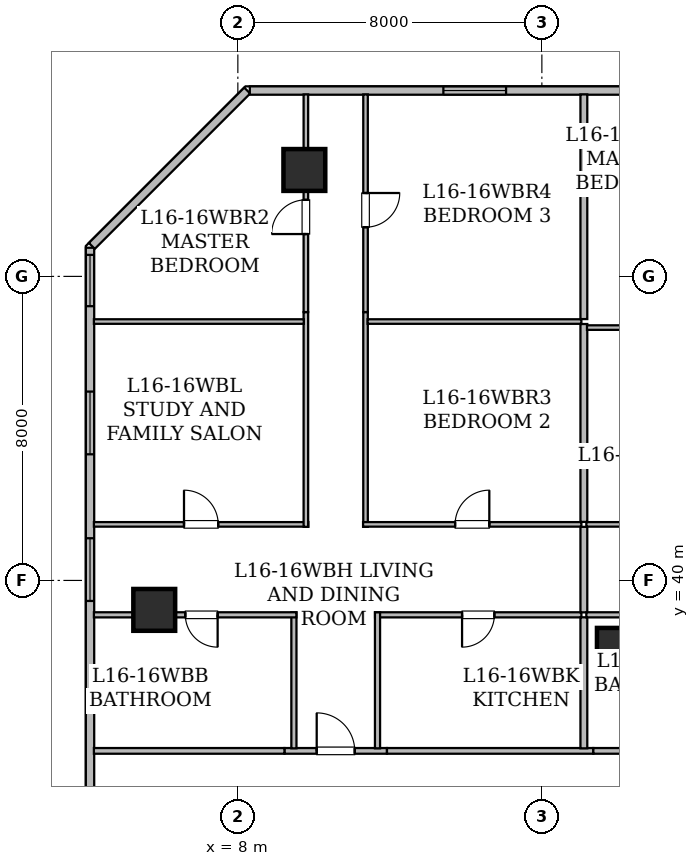
"""IFC4 building model, lengths in metres.
Left out: names, types, materials, properties, quantities, classifications, styles, units other than length and angle.
Written with IfcOpenShell. Run it as: python <this file> out.ifc"""

import sys

from ifc_helpers import new_model, si_unit, direction, frame, frame_2d, origin, origin_2d, place, context, subcontext, project, spatial, rectangle, hollow_rectangle, extrude, element, fill, save


model = new_model("IFC4")
c1 = context("Model", 3, precision=1e-05, world=origin(), true_north=direction((0.0, 1.0)))
c2 = subcontext(c1, "Body", "Model", "MODEL_VIEW")
j1 = project(units=[si_unit("LENGTHUNIT", "METRE"), si_unit("PLANEANGLEUNIT", "RADIAN")], contexts=[c1])
p1 = place(None, origin())
s1 = spatial("IfcSite", under=j1, at=p1, CompositionType="ELEMENT")
p2 = place(p1, origin())
s2 = spatial("IfcBuilding", under=s1, at=p2, CompositionType="ELEMENT")
p3 = place(p2, frame((0.0, 0.0, 66.15)))
s3 = spatial("IfcBuildingStorey", under=s2, at=p3, CompositionType="ELEMENT", Elevation=66.15)
for number, where, z_axis, x_axis in (
    (1, (9.75, 50.8, 0.0), (0.0, 0.0, 1.0), (1.0, 0.0, 0.0)),
    (2, (5.8, 39.225, 0.0), (0.0, 0.0, 1.0), (1.0, 0.0, 0.0)),
    (3, (18.0, 38.2, 0.0), (0.0, 0.0, 1.0), (1.0, 0.0, 0.0)),
):
    element("IfcColumn", number, at=place(p3, frame(where, z_axis=z_axis, x_axis=x_axis)), inside=s3, PredefinedType="COLUMN", context=c2, shape_type="SweptSolid", body=[
        extrude(hollow_rectangle(XDim=1.1, YDim=1.1, WallThickness=0.055, at=origin_2d()), origin(), (0.0, 0.0, 1.0), 3.65),
    ])
p4 = place(p3, frame((4.11, 31.295, 0.0), z_axis=(0.0, 0.0, 1.0), x_axis=(0.0, 1.0, 0.0)))
e4 = element("IfcWall", 4, at=p4, inside=s3, PredefinedType="STANDARD", context=c2, shape_type="SweptSolid", body=[
    extrude(rectangle(XDim=17.459, YDim=0.22, at=frame_2d((8.729, 0.0))), origin(), (0.0, 0.0, 1.0), 3.43),
])
p5 = place(p4, frame((8.165, 0.0, 0.85)))
e5 = element("IfcOpeningElement", 5, at=p5, cuts=e4, PredefinedType="OPENING", context=c2, shape_type="SweptSolid", body=[
    extrude(rectangle(XDim=1.65, YDim=1.55, at=frame_2d((0.825, 0.775))), frame((0.0, 0.12, 0.0), z_axis=(0.0, -1.0, 0.0), x_axis=(1.0, 0.0, 0.0)), (0.0, 0.0, 1.0), 0.24),
])
p6 = place(p4, frame((12.024, 0.0, 0.85)))
e6 = element("IfcOpeningElement", 6, at=p6, cuts=e4, PredefinedType="OPENING", context=c2, shape_type="SweptSolid", body=[
    extrude(rectangle(XDim=1.65, YDim=1.55, at=frame_2d((0.825, 0.775))), frame((0.0, 0.12, 0.0), z_axis=(0.0, -1.0, 0.0), x_axis=(1.0, 0.0, 0.0)), (0.0, 0.0, 1.0), 0.24),
])
p7 = place(p4, frame((15.921, 0.0, 0.85)))
e7 = element("IfcOpeningElement", 7, at=p7, cuts=e4, PredefinedType="OPENING", context=c2, shape_type="SweptSolid", body=[
    extrude(rectangle(XDim=1.35, YDim=1.5, at=frame_2d((0.675, 0.75))), frame((0.0, 0.12, 0.0), z_axis=(0.0, -1.0, 0.0), x_axis=(1.0, 0.0, 0.0)), (0.0, 0.0, 1.0), 0.24),
])
p8 = place(p3, frame((4.158, 48.802, 0.0), z_axis=(0.0, 0.0, 1.0), x_axis=(0.70712789547, 0.707085666273, 0.0)))
e8 = element("IfcWall", 8, at=p8, inside=s3, PredefinedType="STANDARD", context=c2, shape_type="SweptSolid", body=[
    extrude(rectangle(XDim=5.781, YDim=0.22, at=frame_2d((2.891, 0.0))), origin(), (0.0, 0.0, 1.0), 3.43),
])
p9 = place(p3, frame((8.315, 52.89, 0.0), z_axis=(0.0, 0.0, 1.0), x_axis=(1.0, 0.0, 0.0)))
e9 = element("IfcWall", 9, at=p9, inside=s3, PredefinedType="STANDARD", context=c2, shape_type="SweptSolid", body=[
    extrude(rectangle(XDim=37.439, YDim=0.22, at=frame_2d((18.719, 0.0))), origin(), (0.0, 0.0, 1.0), 3.43),
])
p10 = place(p9, frame((5.093, 0.0, 0.85)))
e10 = element("IfcOpeningElement", 10, at=p10, cuts=e9, PredefinedType="OPENING", context=c2, shape_type="SweptSolid", body=[
    extrude(rectangle(XDim=1.65, YDim=1.55, at=frame_2d((0.825, 0.775))), frame((0.0, 0.12, 0.0), z_axis=(0.0, -1.0, 0.0), x_axis=(1.0, 0.0, 0.0)), (0.0, 0.0, 1.0), 0.24),
])
p11 = place(p9, frame((13.055, 0.0, 0.8)))
e11 = element("IfcOpeningElement", 11, at=p11, cuts=e9, PredefinedType="OPENING", context=c2, shape_type="SweptSolid", body=[
    extrude(rectangle(XDim=1.2, YDim=1.5, at=frame_2d((0.6, 0.75))), frame((0.0, 0.12, 0.0), z_axis=(0.0, -1.0, 0.0), x_axis=(1.0, 0.0, 0.0)), (0.0, 0.0, 1.0), 0.24),
])
p12 = place(p9, frame((10.005, 0.0, 0.85)))
e12 = element("IfcOpeningElement", 12, at=p12, cuts=e9, PredefinedType="OPENING", context=c2, shape_type="SweptSolid", body=[
    extrude(rectangle(XDim=1.65, YDim=1.55, at=frame_2d((0.825, 0.775))), frame((0.0, 0.12, 0.0), z_axis=(0.0, -1.0, 0.0), x_axis=(1.0, 0.0, 0.0)), (0.0, 0.0, 1.0), 0.24),
])
p13 = place(p9, frame((15.655, 0.0, 0.85)))
e13 = element("IfcOpeningElement", 13, at=p13, cuts=e9, PredefinedType="OPENING", context=c2, shape_type="SweptSolid", body=[
    extrude(rectangle(XDim=1.65, YDim=1.55, at=frame_2d((0.825, 0.775))), frame((0.0, 0.12, 0.0), z_axis=(0.0, -1.0, 0.0), x_axis=(1.0, 0.0, 0.0)), (0.0, 0.0, 1.0), 0.24),
])
p14 = place(p9, frame((25.185, 0.0, 0.8)))
e14 = element("IfcOpeningElement", 14, at=p14, cuts=e9, PredefinedType="OPENING", context=c2, shape_type="SweptSolid", body=[
    extrude(rectangle(XDim=1.2, YDim=1.5, at=frame_2d((0.6, 0.75))), frame((0.0, 0.12, 0.0), z_axis=(0.0, -1.0, 0.0), x_axis=(1.0, 0.0, 0.0)), (0.0, 0.0, 1.0), 0.24),
])
p15 = place(p9, frame((20.935, 0.0, 0.85)))
e15 = element("IfcOpeningElement", 15, at=p15, cuts=e9, PredefinedType="OPENING", context=c2, shape_type="SweptSolid", body=[
    extrude(rectangle(XDim=1.65, YDim=1.55, at=frame_2d((0.825, 0.775))), frame((0.0, 0.12, 0.0), z_axis=(0.0, -1.0, 0.0), x_axis=(1.0, 0.0, 0.0)), (0.0, 0.0, 1.0), 0.24),
])
p16 = place(p9, frame((28.985, 0.0, 0.85)))
e16 = element("IfcOpeningElement", 16, at=p16, cuts=e9, PredefinedType="OPENING", context=c2, shape_type="SweptSolid", body=[
    extrude(rectangle(XDim=1.65, YDim=1.55, at=frame_2d((0.825, 0.775))), frame((0.0, 0.12, 0.0), z_axis=(0.0, -1.0, 0.0), x_axis=(1.0, 0.0, 0.0)), (0.0, 0.0, 1.0), 0.24),
])
p17 = place(p9, frame((33.49, 0.0, 0.85)))
e17 = element("IfcOpeningElement", 17, at=p17, cuts=e9, PredefinedType="OPENING", context=c2, shape_type="SweptSolid", body=[
    extrude(rectangle(XDim=1.65, YDim=1.55, at=frame_2d((0.825, 0.775))), frame((0.0, 0.12, 0.0), z_axis=(0.0, -1.0, 0.0), x_axis=(1.0, 0.0, 0.0)), (0.0, 0.0, 1.0), 0.24),
])
p18 = place(p9, frame((35.942, 0.0, 0.85)))
e18 = element("IfcOpeningElement", 18, at=p18, cuts=e9, PredefinedType="OPENING", context=c2, shape_type="SweptSolid", body=[
    extrude(rectangle(XDim=1.35, YDim=1.5, at=frame_2d((0.675, 0.75))), frame((0.0, 0.12, 0.0), z_axis=(0.0, -1.0, 0.0), x_axis=(1.0, 0.0, 0.0)), (0.0, 0.0, 1.0), 0.24),
])
p19 = place(p3, frame((9.226, 35.515, 0.0), z_axis=(0.0, 0.0, 1.0), x_axis=(1.0, 0.0, 0.0)))
e19 = element("IfcWall", 19, at=p19, inside=s3, PredefinedType="STANDARD", context=c2, shape_type="SweptSolid", body=[
    extrude(rectangle(XDim=2.698, YDim=0.15, at=frame_2d((1.349, 0.0))), origin(), (0.0, 0.0, 1.0), 3.43),
])
p20 = place(p19, frame((0.849, 0.0, 0.0)))
e20 = element("IfcOpeningElement", 20, at=p20, cuts=e19, PredefinedType="OPENING", context=c2, shape_type="SweptSolid", body=[
    extrude(rectangle(XDim=1.0, YDim=2.15, at=frame_2d((0.5, 1.075))), frame((0.0, 0.085, 0.0), z_axis=(0.0, -1.0, 0.0), x_axis=(1.0, 0.0, 0.0)), (0.0, 0.0, 1.0), 0.17),
])
p21 = place(p3, frame((4.212, 35.515, 0.0), z_axis=(0.0, 0.0, 1.0), x_axis=(1.0, 0.0, 0.0)))
e21 = element("IfcWall", 21, at=p21, inside=s3, PredefinedType="STANDARD", context=c2, shape_type="SweptSolid", body=[
    extrude(rectangle(XDim=5.014, YDim=0.15, at=frame_2d((2.507, 0.0))), origin(), (0.0, 0.0, 1.0), 2.803),
])
p22 = place(p3, frame((11.924, 35.515, 0.0), z_axis=(0.0, 0.0, 1.0), x_axis=(1.0, 0.0, 0.0)))
e22 = element("IfcWall", 22, at=p22, inside=s3, PredefinedType="STANDARD", context=c2, shape_type="SweptSolid", body=[
    extrude(rectangle(XDim=5.43, YDim=0.15, at=frame_2d((2.715, 0.0))), origin(), (0.0, 0.0, 1.0), 3.43),
])
p23 = place(p3, frame((17.354, 35.515, 0.0), z_axis=(0.0, 0.0, 1.0), x_axis=(1.0, 0.0, 0.0)))
e23 = element("IfcWall", 23, at=p23, inside=s3, PredefinedType="STANDARD", context=c2, shape_type="SweptSolid", body=[
    extrude(rectangle(XDim=3.267, YDim=0.15, at=frame_2d((1.634, 0.0))), origin(), (0.0, 0.0, 1.0), 2.647),
])
p24 = place(p3, frame((9.475, 35.582, 0.0), z_axis=(0.0, 0.0, 1.0), x_axis=(0.0, 1.0, 0.0)))
e24 = element("IfcWall", 24, at=p24, inside=s3, PredefinedType="PARTITIONING", context=c2, shape_type="SweptSolid", body=[
    extrude(rectangle(XDim=3.578, YDim=0.135, at=frame_2d((1.789, 0.0))), origin(), (0.0, 0.0, 1.0), 2.647),
])
p25 = place(p3, frame((9.54, 39.095, 0.0), z_axis=(0.0, 0.0, 1.0), x_axis=(-1.0, 0.0, 0.0)))
e25 = element("IfcWall", 25, at=p25, inside=s3, PredefinedType="PARTITIONING", context=c2, shape_type="SweptSolid", body=[
    extrude(rectangle(XDim=5.328, YDim=0.135, at=frame_2d((2.664, 0.0))), origin(), (0.0, 0.0, 1.0), 2.647),
])
p26 = place(p25, frame((2.072, 0.0, 0.0)))
e26 = element("IfcOpeningElement", 26, at=p26, cuts=e25, PredefinedType="OPENING", context=c2, shape_type="SweptSolid", body=[
    extrude(rectangle(XDim=0.85, YDim=2.1, at=frame_2d((0.425, 1.05))), frame((0.0, 0.077, 0.0), z_axis=(0.0, -1.0, 0.0), x_axis=(1.0, 0.0, 0.0)), (0.0, 0.0, 1.0), 0.155),
])
p27 = place(p3, frame((17.04, 39.095, 0.0), z_axis=(0.0, 0.0, 1.0), x_axis=(-1.0, 0.0, 0.0)))
e27 = element("IfcWall", 27, at=p27, inside=s3, PredefinedType="PARTITIONING", context=c2, shape_type="SweptSolid", body=[
    extrude(rectangle(XDim=5.43, YDim=0.135, at=frame_2d((2.715, 0.0))), origin(), (0.0, 0.0, 1.0), 2.647),
])
p28 = place(p27, frame((2.29, 0.0, 0.0)))
e28 = element("IfcOpeningElement", 28, at=p28, cuts=e27, PredefinedType="OPENING", context=c2, shape_type="SweptSolid", body=[
    extrude(rectangle(XDim=0.85, YDim=2.1, at=frame_2d((0.425, 1.05))), frame((0.0, 0.077, 0.0), z_axis=(0.0, -1.0, 0.0), x_axis=(1.0, 0.0, 0.0)), (0.0, 0.0, 1.0), 0.155),
])
p29 = place(p3, frame((11.675, 39.16, 0.0), z_axis=(0.0, 0.0, 1.0), x_axis=(0.0, -1.0, 0.0)))
e29 = element("IfcWall", 29, at=p29, inside=s3, PredefinedType="PARTITIONING", context=c2, shape_type="SweptSolid", body=[
    extrude(rectangle(XDim=3.578, YDim=0.135, at=frame_2d((1.789, 0.0))), origin(), (0.0, 0.0, 1.0), 2.647),
])
p30 = place(p3, frame((4.212, 41.475, 0.0), z_axis=(0.0, 0.0, 1.0), x_axis=(1.0, 0.0, 0.0)))
e30 = element("IfcWall", 30, at=p30, inside=s3, PredefinedType="PARTITIONING", context=c2, shape_type="SweptSolid", body=[
    extrude(rectangle(XDim=5.643, YDim=0.12, at=frame_2d((2.822, 0.0))), origin(), (0.0, 0.0, 1.0), 2.803),
])
p31 = place(p30, frame((2.371, 0.0, 0.0)))
e31 = element("IfcOpeningElement", 31, at=p31, cuts=e30, PredefinedType="OPENING", context=c2, shape_type="SweptSolid", body=[
    extrude(rectangle(XDim=0.9, YDim=2.1, at=frame_2d((0.45, 1.05))), frame((0.0, 0.07, 0.0), z_axis=(0.0, -1.0, 0.0), x_axis=(1.0, 0.0, 0.0)), (0.0, 0.0, 1.0), 0.14),
])
p32 = place(p3, frame((9.79, 41.41, 0.0), z_axis=(0.0, 0.0, 1.0), x_axis=(0.0, 1.0, 0.0)))
e32 = element("IfcWall", 32, at=p32, inside=s3, PredefinedType="PARTITIONING", context=c2, shape_type="SweptSolid", body=[
    extrude(rectangle(XDim=5.651, YDim=0.12, at=frame_2d((2.826, 0.0))), origin(), (0.0, 0.0, 1.0), 3.065),
])
p33 = place(p3, frame((9.79, 47.061, 0.0), z_axis=(0.0, 0.0, 1.0), x_axis=(0.0, 1.0, 0.0)))
e33 = element("IfcWall", 33, at=p33, inside=s3, PredefinedType="PARTITIONING", context=c2, shape_type="SweptSolid", body=[
    extrude(rectangle(XDim=5.727, YDim=0.12, at=frame_2d((2.864, 0.0))), origin(), (0.0, 0.0, 1.0), 2.647),
])
p34 = place(p33, frame((2.053, 0.0, 0.0)))
e34 = element("IfcOpeningElement", 34, at=p34, cuts=e33, PredefinedType="OPENING", context=c2, shape_type="SweptSolid", body=[
    extrude(rectangle(XDim=0.9, YDim=2.1, at=frame_2d((0.45, 1.05))), frame((0.0, 0.07, 0.0), z_axis=(0.0, -1.0, 0.0), x_axis=(1.0, 0.0, 0.0)), (0.0, 0.0, 1.0), 0.14),
])
p35 = place(p3, frame((11.36, 47.061, 0.0), z_axis=(0.0, 0.0, 1.0), x_axis=(0.0, -1.0, 0.0)))
e35 = element("IfcWall", 35, at=p35, inside=s3, PredefinedType="PARTITIONING", context=c2, shape_type="SweptSolid", body=[
    extrude(rectangle(XDim=5.651, YDim=0.12, at=frame_2d((2.826, 0.0))), origin(), (0.0, 0.0, 1.0), 3.065),
])
p36 = place(p3, frame((11.295, 41.475, 0.0), z_axis=(0.0, 0.0, 1.0), x_axis=(1.0, 0.0, 0.0)))
e36 = element("IfcWall", 36, at=p36, inside=s3, PredefinedType="PARTITIONING", context=c2, shape_type="SweptSolid", body=[
    extrude(rectangle(XDim=5.745, YDim=0.12, at=frame_2d((2.873, 0.0))), origin(), (0.0, 0.0, 1.0), 2.647),
])
p37 = place(p36, frame((2.422, 0.0, 0.0)))
e37 = element("IfcOpeningElement", 37, at=p37, cuts=e36, PredefinedType="OPENING", context=c2, shape_type="SweptSolid", body=[
    extrude(rectangle(XDim=0.9, YDim=2.1, at=frame_2d((0.45, 1.05))), frame((0.0, 0.07, 0.0), z_axis=(0.0, -1.0, 0.0), x_axis=(1.0, 0.0, 0.0)), (0.0, 0.0, 1.0), 0.14),
])
p38 = place(p3, frame((11.36, 52.788, 0.0), z_axis=(0.0, 0.0, 1.0), x_axis=(0.0, -1.0, 0.0)))
e38 = element("IfcWall", 38, at=p38, inside=s3, PredefinedType="PARTITIONING", context=c2, shape_type="SweptSolid", body=[
    extrude(rectangle(XDim=5.727, YDim=0.12, at=frame_2d((2.864, 0.0))), origin(), (0.0, 0.0, 1.0), 2.647),
])
p39 = place(p38, frame((2.594, 0.0, 0.0)))
e39 = element("IfcOpeningElement", 39, at=p39, cuts=e38, PredefinedType="OPENING", context=c2, shape_type="SweptSolid", body=[
    extrude(rectangle(XDim=0.9, YDim=2.1, at=frame_2d((0.45, 1.05))), frame((0.0, 0.07, 0.0), z_axis=(0.0, -1.0, 0.0), x_axis=(1.0, 0.0, 0.0)), (0.0, 0.0, 1.0), 0.14),
])
p40 = place(p3, frame((17.105, 41.41, 0.0), z_axis=(0.0, 0.0, 1.0), x_axis=(0.0, -1.0, 0.0)))
e40 = element("IfcWall", 40, at=p40, inside=s3, PredefinedType="STANDARD", context=c2, shape_type="SweptSolid", body=[
    extrude(rectangle(XDim=2.25, YDim=0.18, at=frame_2d((1.125, 0.0))), origin(), (0.0, 0.0, 1.0), 2.647),
])
p41 = place(p3, frame((17.105, 39.03, 0.0), z_axis=(0.0, 0.0, 1.0), x_axis=(0.0, -1.0, 0.0)))
e41 = element("IfcWall", 41, at=p41, inside=s3, PredefinedType="STANDARD", context=c2, shape_type="SweptSolid", body=[
    extrude(rectangle(XDim=3.448, YDim=0.18, at=frame_2d((1.724, 0.0))), origin(), (0.0, 0.0, 1.0), 2.647),
])
p42 = place(p3, frame((4.212, 46.812, 0.0), z_axis=(0.0, 0.0, 1.0), x_axis=(1.0, 0.0, 0.0)))
e42 = element("IfcWall", 42, at=p42, inside=s3, PredefinedType="PARTITIONING", context=c2, shape_type="SweptSolid", body=[
    extrude(rectangle(XDim=5.524, YDim=0.12, at=frame_2d((2.762, 0.0))), origin(), (0.0, 0.0, 1.0), 2.803),
])
p43 = place(p3, frame((11.414, 46.812, 0.0), z_axis=(0.0, 0.0, 1.0), x_axis=(1.0, 0.0, 0.0)))
e43 = element("IfcWall", 43, at=p43, inside=s3, PredefinedType="PARTITIONING", context=c2, shape_type="SweptSolid", body=[
    extrude(rectangle(XDim=5.626, YDim=0.12, at=frame_2d((2.813, 0.0))), origin(), (0.0, 0.0, 1.0), 2.647),
])
p44 = place(p3, frame((17.105, 46.747, 0.0), z_axis=(0.0, 0.0, 1.0), x_axis=(0.0, -1.0, 0.0)))
e44 = element("IfcWall", 44, at=p44, inside=s3, PredefinedType="STANDARD", context=c2, shape_type="SweptSolid", body=[
    extrude(rectangle(XDim=5.207, YDim=0.18, at=frame_2d((2.604, 0.0))), origin(), (0.0, 0.0, 1.0), 3.065),
])
p45 = place(p3, frame((17.105, 52.788, 0.0), z_axis=(0.0, 0.0, 1.0), x_axis=(0.0, -1.0, 0.0)))
e45 = element("IfcWall", 45, at=p45, inside=s3, PredefinedType="STANDARD", context=c2, shape_type="SweptSolid", body=[
    extrude(rectangle(XDim=5.911, YDim=0.18, at=frame_2d((2.956, 0.0))), origin(), (0.0, 0.0, 1.0), 2.803),
])
p46 = place(p3, frame((20.935, 39.095, 0.0), z_axis=(0.0, 0.0, 1.0), x_axis=(-1.0, 0.0, 0.0)))
e46 = element("IfcWall", 46, at=p46, inside=s3, PredefinedType="PARTITIONING", context=c2, shape_type="SweptSolid", body=[
    extrude(rectangle(XDim=3.765, YDim=0.135, at=frame_2d((1.883, 0.0))), origin(), (0.0, 0.0, 1.0), 2.647),
])
p47 = place(p46, frame((1.458, 0.0, 0.0)))
e47 = element("IfcOpeningElement", 47, at=p47, cuts=e46, PredefinedType="OPENING", context=c2, shape_type="SweptSolid", body=[
    extrude(rectangle(XDim=0.85, YDim=2.1, at=frame_2d((0.425, 1.05))), frame((0.0, 0.077, 0.0), z_axis=(0.0, -1.0, 0.0), x_axis=(1.0, 0.0, 0.0)), (0.0, 0.0, 1.0), 0.155),
])
p48 = place(p3, frame((17.17, 41.475, 0.0), z_axis=(0.0, 0.0, 1.0), x_axis=(1.0, 0.0, 0.0)))
e48 = element("IfcWall", 48, at=p48, inside=s3, PredefinedType="PARTITIONING", context=c2, shape_type="SweptSolid", body=[
    extrude(rectangle(XDim=4.08, YDim=0.12, at=frame_2d((2.04, 0.0))), origin(), (0.0, 0.0, 1.0), 2.647),
])
p49 = place(p3, frame((17.187, 46.653, 0.0), z_axis=(0.0, 0.0, 1.0), x_axis=(1.0, 0.0, 0.0)))
e49 = element("IfcWall", 49, at=p49, inside=s3, PredefinedType="PARTITIONING", context=c2, shape_type="SweptSolid", body=[
    extrude(rectangle(XDim=3.944, YDim=0.12, at=frame_2d((1.972, 0.0))), origin(), (0.0, 0.0, 1.0), 2.647),
])
p50 = place(p5, origin())
e50 = element("IfcWindow", 50, at=p50, inside=s3, PartitioningType="SINGLE_PANEL", PredefinedType="WINDOW", context=c2, shape_type="SweptSolid", body=[
    extrude(rectangle(XDim=1.65, YDim=1.55, at=frame_2d((0.825, 0.775))), frame((0.0, 0.03, 0.0), z_axis=(0.0, -1.0, 0.0), x_axis=(1.0, 0.0, 0.0)), (0.0, 0.0, 1.0), 0.06),
])
fill(e5, e50)
p51 = place(p6, origin())
e51 = element("IfcWindow", 51, at=p51, inside=s3, PartitioningType="SINGLE_PANEL", PredefinedType="WINDOW", context=c2, shape_type="SweptSolid", body=[
    extrude(rectangle(XDim=1.65, YDim=1.55, at=frame_2d((0.825, 0.775))), frame((0.0, 0.03, 0.0), z_axis=(0.0, -1.0, 0.0), x_axis=(1.0, 0.0, 0.0)), (0.0, 0.0, 1.0), 0.06),
])
fill(e6, e51)
p52 = place(p7, origin())
e52 = element("IfcWindow", 52, at=p52, inside=s3, PartitioningType="SINGLE_PANEL", PredefinedType="WINDOW", context=c2, shape_type="SweptSolid", body=[
    extrude(rectangle(XDim=1.35, YDim=1.5, at=frame_2d((0.675, 0.75))), frame((0.0, 0.03, 0.0), z_axis=(0.0, -1.0, 0.0), x_axis=(1.0, 0.0, 0.0)), (0.0, 0.0, 1.0), 0.06),
])
fill(e7, e52)
p53 = place(p10, origin())
e53 = element("IfcWindow", 53, at=p53, inside=s3, PartitioningType="SINGLE_PANEL", PredefinedType="WINDOW", context=c2, shape_type="SweptSolid", body=[
    extrude(rectangle(XDim=1.65, YDim=1.55, at=frame_2d((0.825, 0.775))), frame((0.0, 0.03, 0.0), z_axis=(0.0, -1.0, 0.0), x_axis=(1.0, 0.0, 0.0)), (0.0, 0.0, 1.0), 0.06),
])
fill(e10, e53)
p54 = place(p20, origin())
e54 = element("IfcDoor", 54, at=p54, inside=s3, OperationType="SINGLE_SWING_LEFT", PredefinedType="DOOR", context=c2, shape_type="SweptSolid", body=[
    extrude(rectangle(XDim=1.0, YDim=2.15, at=frame_2d((0.5, 1.075))), frame((0.0, 0.025, 0.0), z_axis=(0.0, -1.0, 0.0), x_axis=(1.0, 0.0, 0.0)), (0.0, 0.0, 1.0), 0.05),
])
fill(e20, e54)
p55 = place(p26, origin())
e55 = element("IfcDoor", 55, at=p55, inside=s3, OperationType="SINGLE_SWING_LEFT", PredefinedType="DOOR", context=c2, shape_type="SweptSolid", body=[
    extrude(rectangle(XDim=0.85, YDim=2.1, at=frame_2d((0.425, 1.05))), frame((0.0, 0.025, 0.0), z_axis=(0.0, -1.0, 0.0), x_axis=(1.0, 0.0, 0.0)), (0.0, 0.0, 1.0), 0.05),
])
fill(e26, e55)
p56 = place(p28, origin())
e56 = element("IfcDoor", 56, at=p56, inside=s3, OperationType="SINGLE_SWING_RIGHT", PredefinedType="DOOR", context=c2, shape_type="SweptSolid", body=[
    extrude(rectangle(XDim=0.85, YDim=2.1, at=frame_2d((0.425, 1.05))), frame((0.0, 0.025, 0.0), z_axis=(0.0, -1.0, 0.0), x_axis=(1.0, 0.0, 0.0)), (0.0, 0.0, 1.0), 0.05),
])
fill(e28, e56)
p57 = place(p31, origin())
e57 = element("IfcDoor", 57, at=p57, inside=s3, OperationType="SINGLE_SWING_LEFT", PredefinedType="DOOR", context=c2, shape_type="SweptSolid", body=[
    extrude(rectangle(XDim=0.9, YDim=2.1, at=frame_2d((0.45, 1.05))), frame((0.0, 0.025, 0.0), z_axis=(0.0, -1.0, 0.0), x_axis=(1.0, 0.0, 0.0)), (0.0, 0.0, 1.0), 0.05),
])
fill(e31, e57)
p58 = place(p34, origin())
e58 = element("IfcDoor", 58, at=p58, inside=s3, OperationType="SINGLE_SWING_LEFT", PredefinedType="DOOR", context=c2, shape_type="SweptSolid", body=[
    extrude(rectangle(XDim=0.9, YDim=2.1, at=frame_2d((0.45, 1.05))), frame((0.0, 0.025, 0.0), z_axis=(0.0, -1.0, 0.0), x_axis=(1.0, 0.0, 0.0)), (0.0, 0.0, 1.0), 0.05),
])
fill(e34, e58)
p59 = place(p37, origin())
e59 = element("IfcDoor", 59, at=p59, inside=s3, OperationType="SINGLE_SWING_RIGHT", PredefinedType="DOOR", context=c2, shape_type="SweptSolid", body=[
    extrude(rectangle(XDim=0.9, YDim=2.1, at=frame_2d((0.45, 1.05))), frame((0.0, 0.025, 0.0), z_axis=(0.0, -1.0, 0.0), x_axis=(1.0, 0.0, 0.0)), (0.0, 0.0, 1.0), 0.05),
])
fill(e37, e59)
p60 = place(p39, origin())
e60 = element("IfcDoor", 60, at=p60, inside=s3, OperationType="SINGLE_SWING_LEFT", PredefinedType="DOOR", context=c2, shape_type="SweptSolid", body=[
    extrude(rectangle(XDim=0.9, YDim=2.1, at=frame_2d((0.45, 1.05))), frame((0.0, 0.025, 0.0), z_axis=(0.0, -1.0, 0.0), x_axis=(1.0, 0.0, 0.0)), (0.0, 0.0, 1.0), 0.05),
])
fill(e39, e60)
save(model, sys.argv[1])
